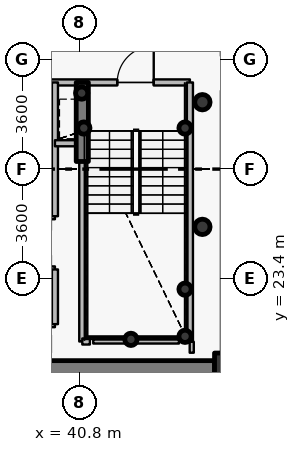
"""IFC4 building model, lengths in metres.
Left out: names, types, materials, properties, quantities, classifications, styles, units other than length and angle.
Written with IfcOpenShell. Run it as: python <this file> out.ifc"""

import sys

from ifc_helpers import new_model, si_unit, direction, frame, frame_2d, origin, origin_2d, place, context, subcontext, project, spatial, rectangle, hollow_circle, extrude, source, transform, mapped, element, fill, save


model = new_model("IFC4")
c1 = context("Model", 3, precision=1e-05, world=origin(), true_north=direction((0.0, 1.0)))
c2 = subcontext(c1, "Body", "Model", "MODEL_VIEW")
j1 = project(units=[si_unit("LENGTHUNIT", "METRE"), si_unit("PLANEANGLEUNIT", "RADIAN")], contexts=[c1])
p1 = place(None, origin())
s1 = spatial("IfcSite", under=j1, at=p1, CompositionType="ELEMENT")
p2 = place(p1, origin())
s2 = spatial("IfcBuilding", under=s1, at=p2, CompositionType="ELEMENT")
p3 = place(p2, origin())
s3 = spatial("IfcBuildingStorey", under=s2, at=p3, CompositionType="ELEMENT", Elevation=0.0)
p4 = place(p3, frame((45.95, 20.25, 0.0), z_axis=(0.0, 0.0, 1.0), x_axis=(1.0, 0.0, 0.0)))
e1 = element("IfcColumn", 1, at=p4, inside=s3, PredefinedType="COLUMN", context=c2, shape_type="SweptSolid", body=[
    extrude(rectangle(XDim=1.4, YDim=1.4, at=origin_2d()), origin(), (0.0, 0.0, 1.0), 6.0),
])
for number, where, z_axis, x_axis in (
    (2, (44.28, 21.5, 0.0), (0.0, 0.0, 1.0), (1.0, 0.0, 0.0)),
    (3, (44.28, 23.05, 0.0), (0.0, 0.0, 1.0), (1.0, 0.0, 0.0)),
    (4, (42.5, 21.4, 0.0), (0.0, 0.0, 1.0), (1.0, 0.0, 0.0)),
    (5, (40.95, 28.35, 0.0), (0.0, 0.0, 1.0), (1.0, 0.0, 0.0)),
    (6, (44.28, 28.35, 0.0), (0.0, 0.0, 1.0), (1.0, 0.0, 0.0)),
    (7, (40.88, 29.5, 0.0), (0.0, 0.0, 1.0), (1.0, 0.0, 0.0)),
):
    element("IfcColumn", number, at=place(p3, frame(where, z_axis=z_axis, x_axis=x_axis)), inside=s3, PredefinedType="COLUMN", context=c2, shape_type="SweptSolid", body=[
        extrude(hollow_circle(Radius=0.203, WallThickness=0.016, at=origin_2d()), origin(), (0.0, 0.0, 1.0), 6.0),
    ])
p5 = place(p3, frame((45.25, 20.25, 0.0), z_axis=(0.0, 0.0, 1.0), x_axis=(-1.0, 0.0, 0.0)))
e8 = element("IfcWall", 8, at=p5, inside=s3, PredefinedType="SHEAR", context=c2, shape_type="SweptSolid", body=[
    extrude(rectangle(XDim=18.5, YDim=0.9, at=frame_2d((9.25, 0.0))), origin(), (0.0, 0.0, 1.0), 5.15),
])
p6 = place(p5, frame((10.0, 0.0, 0.0)))
e9 = element("IfcOpeningElement", 9, at=p6, cuts=e8, PredefinedType="OPENING", context=c2, shape_type="SweptSolid", body=[
    extrude(rectangle(XDim=1.15, YDim=2.15, at=origin_2d()), frame((0.575, 0.46, 1.075), z_axis=(0.0, -1.0, 0.0), x_axis=(1.0, 0.0, 0.0)), (0.0, 0.0, 1.0), 0.92),
])
p7 = place(p3, frame((40.9, 27.25, 0.0), z_axis=(0.0, 0.0, 1.0), x_axis=(0.0, 1.0, 0.0)))
e10 = element("IfcWall", 10, at=p7, inside=s3, PredefinedType="SHEAR", context=c2, shape_type="SweptSolid", body=[
    extrude(rectangle(XDim=2.6, YDim=0.4, at=frame_2d((1.3, 0.0))), origin(), (0.0, 0.0, 1.0), 5.3),
])
for number, where, z_axis, x_axis in (
    (11, (44.85, 25.1, 0.0), (0.0, 0.0, 1.0), (1.0, 0.0, 0.0)),
    (12, (44.85, 29.2, 0.0), (0.0, 0.0, 1.0), (1.0, 0.0, 0.0)),
):
    element("IfcColumn", number, at=place(p3, frame(where, z_axis=z_axis, x_axis=x_axis)), inside=s3, PredefinedType="COLUMN", context=c2, shape_type="SweptSolid", body=[
        extrude(hollow_circle(Radius=0.254, WallThickness=0.02, at=origin_2d()), origin(), (0.0, 0.0, 1.0), 6.0),
    ])
p8 = place(p3, frame((35.05, 27.25, 0.0), z_axis=(0.0, 0.0, 1.0), x_axis=(1.0, 0.0, 0.0)))
e13 = element("IfcWall", 13, at=p8, inside=s3, PredefinedType="PARTITIONING", context=c2, shape_type="SweptSolid", body=[
    extrude(rectangle(XDim=4.95, YDim=0.2, at=frame_2d((2.475, 0.0))), origin(), (0.0, 0.0, 1.0), 5.285),
])
p9 = place(p3, frame((35.45, 23.7, 0.0), z_axis=(0.0, 0.0, 1.0), x_axis=(1.0, 0.0, 0.0)))
e14 = element("IfcWall", 14, at=p9, inside=s3, PredefinedType="PARTITIONING", context=c2, shape_type="SweptSolid", body=[
    extrude(rectangle(XDim=4.55, YDim=0.2, at=frame_2d((2.275, 0.0))), origin(), (0.0, 0.0, 1.0), 5.285),
])
p10 = place(p9, frame((0.25, 0.0, 0.0)))
e15 = element("IfcOpeningElement", 15, at=p10, cuts=e14, PredefinedType="OPENING", context=c2, shape_type="SweptSolid", body=[
    extrude(rectangle(XDim=1.05, YDim=2.15, at=origin_2d()), frame((0.525, 0.11, 1.075), z_axis=(0.0, -1.0, 0.0), x_axis=(1.0, 0.0, 0.0)), (0.0, 0.0, 1.0), 0.22),
])
p11 = place(p9, frame((1.745, 0.0, 0.0)))
e16 = element("IfcOpeningElement", 16, at=p11, cuts=e14, PredefinedType="OPENING", context=c2, shape_type="SweptSolid", body=[
    extrude(rectangle(XDim=1.05, YDim=2.15, at=origin_2d()), frame((0.525, 0.11, 1.075), z_axis=(0.0, -1.0, 0.0), x_axis=(1.0, 0.0, 0.0)), (0.0, 0.0, 1.0), 0.22),
])
p12 = place(p9, frame((3.165, 0.0, 0.0)))
e17 = element("IfcOpeningElement", 17, at=p12, cuts=e14, PredefinedType="OPENING", context=c2, shape_type="SweptSolid", body=[
    extrude(rectangle(XDim=1.05, YDim=2.15, at=origin_2d()), frame((0.525, 0.11, 1.075), z_axis=(0.0, -1.0, 0.0), x_axis=(1.0, 0.0, 0.0)), (0.0, 0.0, 1.0), 0.22),
])
p13 = place(p3, frame((35.45, 25.45, 0.0), z_axis=(0.0, 0.0, 1.0), x_axis=(1.0, 0.0, 0.0)))
e18 = element("IfcWall", 18, at=p13, inside=s3, PredefinedType="PARTITIONING", context=c2, shape_type="SweptSolid", body=[
    extrude(rectangle(XDim=4.55, YDim=0.2, at=frame_2d((2.275, 0.0))), origin(), (0.0, 0.0, 1.0), 5.285),
])
p14 = place(p13, frame((0.25, 0.0, 0.0)))
e19 = element("IfcOpeningElement", 19, at=p14, cuts=e18, PredefinedType="OPENING", context=c2, shape_type="SweptSolid", body=[
    extrude(rectangle(XDim=1.05, YDim=2.15, at=origin_2d()), frame((0.525, 0.11, 1.075), z_axis=(0.0, -1.0, 0.0), x_axis=(1.0, 0.0, 0.0)), (0.0, 0.0, 1.0), 0.22),
])
p15 = place(p13, frame((1.745, 0.0, 0.0)))
e20 = element("IfcOpeningElement", 20, at=p15, cuts=e18, PredefinedType="OPENING", context=c2, shape_type="SweptSolid", body=[
    extrude(rectangle(XDim=1.05, YDim=2.15, at=origin_2d()), frame((0.525, 0.11, 1.075), z_axis=(0.0, -1.0, 0.0), x_axis=(1.0, 0.0, 0.0)), (0.0, 0.0, 1.0), 0.22),
])
p16 = place(p13, frame((3.165, 0.0, 0.0)))
e21 = element("IfcOpeningElement", 21, at=p16, cuts=e18, PredefinedType="OPENING", context=c2, shape_type="SweptSolid", body=[
    extrude(rectangle(XDim=1.05, YDim=2.15, at=origin_2d()), frame((0.525, 0.11, 1.075), z_axis=(0.0, -1.0, 0.0), x_axis=(1.0, 0.0, 0.0)), (0.0, 0.0, 1.0), 0.22),
])
p17 = place(p3, frame((35.95, 29.85, 0.0), z_axis=(0.0, 0.0, 1.0), x_axis=(1.0, 0.0, 0.0)))
e22 = element("IfcWall", 22, at=p17, inside=s3, PredefinedType="PARTITIONING", context=c2, shape_type="SweptSolid", body=[
    extrude(rectangle(XDim=8.49, YDim=0.2, at=frame_2d((4.245, 0.0))), origin(), (0.0, 0.0, 1.0), 5.285),
])
p18 = place(p17, frame((6.1, 0.0, 0.0)))
e23 = element("IfcOpeningElement", 23, at=p18, cuts=e22, PredefinedType="OPENING", context=c2, shape_type="SweptSolid", body=[
    extrude(rectangle(XDim=1.2, YDim=2.15, at=origin_2d()), frame((0.6, 0.11, 1.075), z_axis=(0.0, -1.0, 0.0), x_axis=(1.0, 0.0, 0.0)), (0.0, 0.0, 1.0), 0.22),
])
p19 = place(p17, frame((0.37, 0.0, 0.0)))
e24 = element("IfcOpeningElement", 24, at=p19, cuts=e22, PredefinedType="OPENING", context=c2, shape_type="SweptSolid", body=[
    extrude(rectangle(XDim=1.15, YDim=2.15, at=origin_2d()), frame((0.575, 0.11, 1.075), z_axis=(0.0, -1.0, 0.0), x_axis=(1.0, 0.0, 0.0)), (0.0, 0.0, 1.0), 0.22),
])
p20 = place(p17, frame((2.425, 0.0, 0.0)))
e25 = element("IfcOpeningElement", 25, at=p20, cuts=e22, PredefinedType="OPENING", context=c2, shape_type="SweptSolid", body=[
    extrude(rectangle(XDim=1.05, YDim=2.15, at=origin_2d()), frame((0.525, 0.11, 1.075), z_axis=(0.0, -1.0, 0.0), x_axis=(1.0, 0.0, 0.0)), (0.0, 0.0, 1.0), 0.22),
])
p21 = place(p3, frame((39.8, 21.9, 0.0), z_axis=(0.0, 0.0, 1.0), x_axis=(1.0, 0.0, 0.0)))
e26 = element("IfcWall", 26, at=p21, inside=s3, PredefinedType="PARTITIONING", context=c2, shape_type="SweptSolid", body=[
    extrude(rectangle(XDim=0.2, YDim=0.2, at=frame_2d((0.1, 0.0))), origin(), (0.0, 0.0, 1.0), 5.7),
])
p22 = place(p3, frame((40.0, 21.9, 0.0), z_axis=(0.0, 0.0, 1.0), x_axis=(0.0, 1.0, 0.0)))
e27 = element("IfcWall", 27, at=p22, inside=s3, PredefinedType="PARTITIONING", context=c2, shape_type="SweptSolid", body=[
    extrude(rectangle(XDim=1.8, YDim=0.2, at=frame_2d((0.9, 0.0))), origin(), (0.0, 0.0, 1.0), 5.7),
])
p23 = place(p3, frame((40.0, 25.45, 0.0), z_axis=(0.0, 0.0, 1.0), x_axis=(0.0, 1.0, 0.0)))
e28 = element("IfcWall", 28, at=p23, inside=s3, PredefinedType="PARTITIONING", context=c2, shape_type="SweptSolid", body=[
    extrude(rectangle(XDim=4.4, YDim=0.2, at=frame_2d((2.2, 0.0))), origin(), (0.0, 0.0, 1.0), 5.7),
])
p24 = place(p3, frame((40.0, 27.85, 0.0), z_axis=(0.0, 0.0, 1.0), x_axis=(1.0, 0.0, 0.0)))
e29 = element("IfcWall", 29, at=p24, inside=s3, PredefinedType="PARTITIONING", context=c2, shape_type="SweptSolid", body=[
    extrude(rectangle(XDim=0.9, YDim=0.2, at=frame_2d((0.45, 0.0))), origin(), (0.0, 0.0, 1.0), 5.7),
])
p25 = place(p3, frame((40.9, 21.33, 0.0), z_axis=(0.0, 0.0, 1.0), x_axis=(0.0, 1.0, 0.0)))
e30 = element("IfcWall", 30, at=p25, inside=s3, PredefinedType="PARTITIONING", context=c2, shape_type="SweptSolid", body=[
    extrude(rectangle(XDim=5.91, YDim=0.2, at=frame_2d((2.955, 0.0))), origin(), (0.0, 0.0, 1.0), 5.235),
])
p26 = place(p3, frame((40.9, 21.33, 0.0), z_axis=(0.0, 0.0, 1.0), x_axis=(1.0, 0.0, 0.0)))
e31 = element("IfcWall", 31, at=p26, inside=s3, PredefinedType="PARTITIONING", context=c2, shape_type="SweptSolid", body=[
    extrude(rectangle(XDim=0.25, YDim=0.2, at=frame_2d((0.125, 0.0))), origin(), (0.0, 0.0, 1.0), 5.235),
])
p27 = place(p3, frame((44.44, 21.33, 0.0), z_axis=(0.0, 0.0, 1.0), x_axis=(0.0, 1.0, 0.0)))
e32 = element("IfcWall", 32, at=p27, inside=s3, PredefinedType="PARTITIONING", context=c2, shape_type="SweptSolid", body=[
    extrude(rectangle(XDim=8.52, YDim=0.2, at=frame_2d((4.26, 0.0))), origin(), (0.0, 0.0, 1.0), 5.7),
])
p28 = place(p3, frame((44.08, 21.33, 0.0), z_axis=(0.0, 0.0, 1.0), x_axis=(-1.0, 0.0, 0.0)))
e33 = element("IfcWall", 33, at=p28, inside=s3, PredefinedType="PARTITIONING", context=c2, shape_type="SweptSolid", body=[
    extrude(rectangle(XDim=2.82, YDim=0.135, at=frame_2d((1.41, 0.0))), origin(), (0.0, 0.0, 1.0), 5.235),
])
p29 = place(p3, frame((44.5, 20.96, 0.0), z_axis=(0.0, 0.0, 1.0), x_axis=(0.0, 1.0, 0.0)))
e34 = element("IfcWall", 34, at=p29, inside=s3, PredefinedType="PARTITIONING", context=c2, shape_type="SweptSolid", body=[
    extrude(rectangle(XDim=0.36, YDim=0.135, at=frame_2d((0.18, 0.0))), origin(), (0.0, 0.0, 1.0), 5.7),
])
m1 = source(origin(), c2, "Body", "SweptSolid", [
    extrude(rectangle(XDim=1.2, YDim=2.15, at=origin_2d()), frame((0.6, 0.025, 1.075), z_axis=(0.0, -1.0, 0.0), x_axis=(1.0, 0.0, 0.0)), (0.0, 0.0, 1.0), 0.05),
])
p30 = place(p18, origin())
e35 = element("IfcDoor", 35, at=p30, inside=s3, OperationType="SINGLE_SWING_RIGHT", PredefinedType="DOOR", context=c2, shape_type="MappedRepresentation", body=[
    mapped(m1, transform((0.0, 0.0, 0.0), x_axis=(1.0, 0.0, 0.0), y_axis=(0.0, 1.0, 0.0), z_axis=(0.0, 0.0, 1.0), scale=1.0)),
])
fill(e23, e35)
save(model, sys.argv[1])
